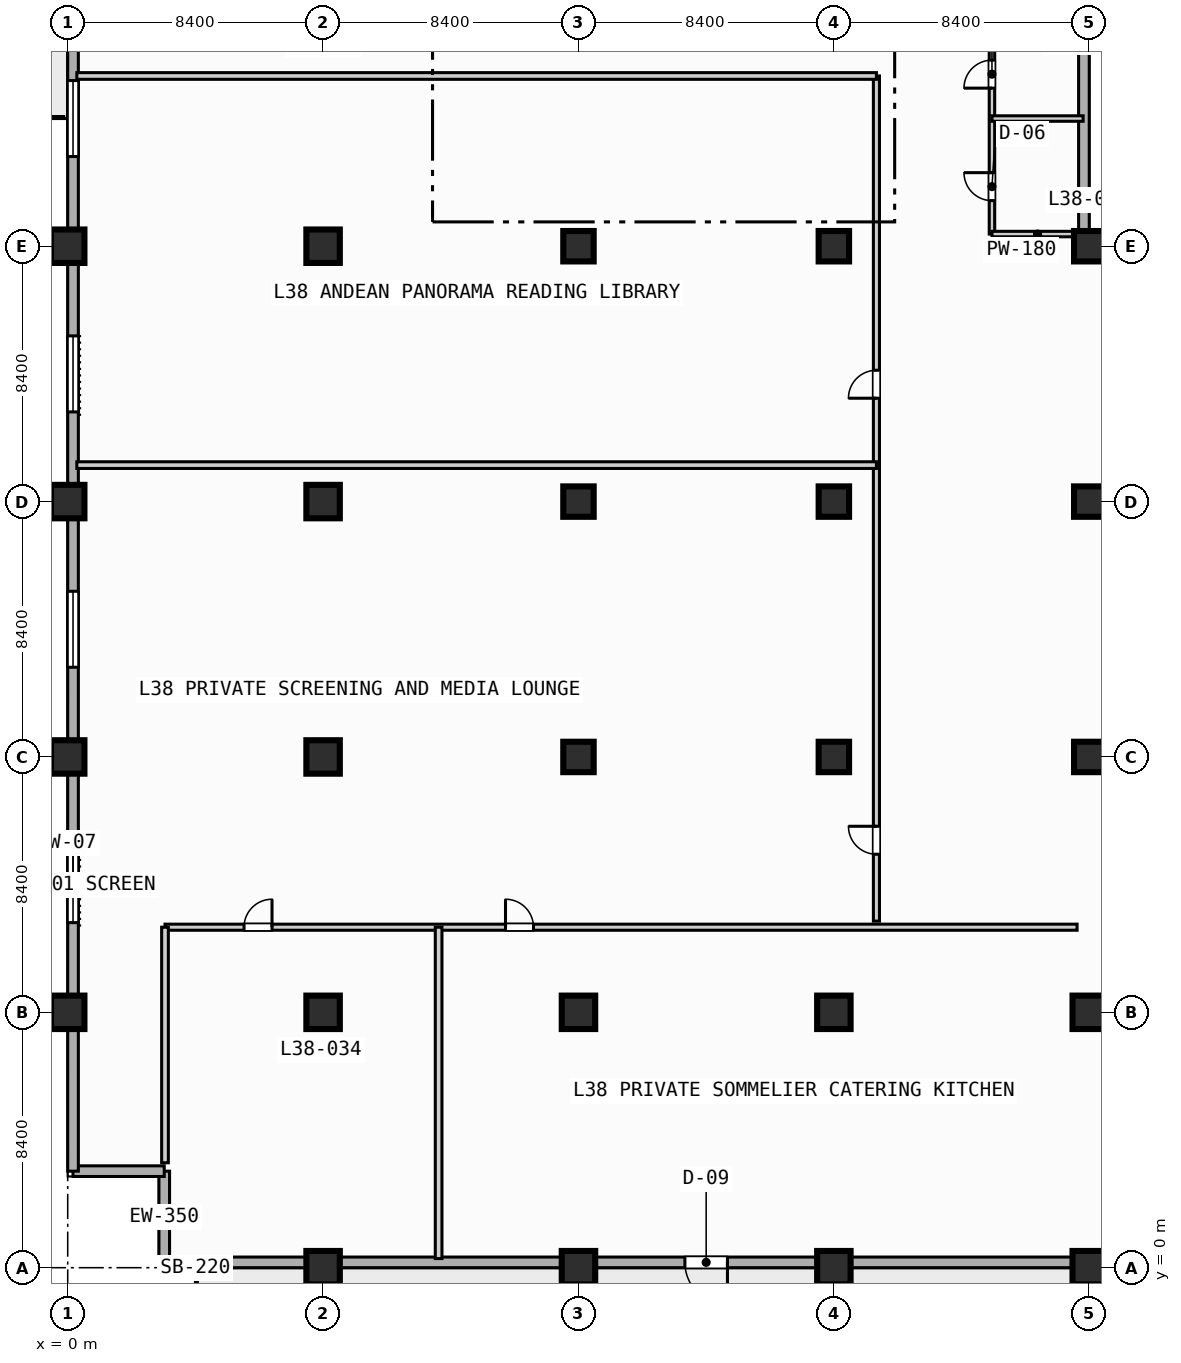
"""IFC4 building model, lengths in metres.
Left out: names, types, materials, properties, quantities, classifications, styles, units other than length and angle.
Written with IfcOpenShell. Run it as: python <this file> out.ifc"""

import sys

from ifc_helpers import new_model, si_unit, direction, frame, frame_2d, origin, origin_2d, place, context, subcontext, project, spatial, rectangle, extrude, element, fill, save


model = new_model("IFC4")
c1 = context("Model", 3, precision=1e-05, world=origin(), true_north=direction((0.0, 1.0)))
c2 = subcontext(c1, "Body", "Model", "MODEL_VIEW")
j1 = project(units=[si_unit("LENGTHUNIT", "METRE"), si_unit("PLANEANGLEUNIT", "RADIAN")], contexts=[c1])
p1 = place(None, origin())
s1 = spatial("IfcSite", under=j1, at=p1, CompositionType="ELEMENT")
p2 = place(p1, origin())
s2 = spatial("IfcBuilding", under=s1, at=p2, CompositionType="ELEMENT")
p3 = place(p2, frame((0.0, 0.0, 157.6)))
s3 = spatial("IfcBuildingStorey", under=s2, at=p3, CompositionType="ELEMENT", Elevation=157.6)
for number, where, z_axis, x_axis in (
    (1, (0.0, 8.4, 0.0), (0.0, 0.0, 1.0), (1.0, 0.0, 0.0)),
    (2, (0.0, 16.8, 0.0), (0.0, 0.0, 1.0), (1.0, 0.0, 0.0)),
    (3, (0.0, 25.2, 0.0), (0.0, 0.0, 1.0), (1.0, 0.0, 0.0)),
    (4, (0.0, 33.6, 0.0), (0.0, 0.0, 1.0), (1.0, 0.0, 0.0)),
    (5, (8.4, 0.0, 0.0), (0.0, 0.0, 1.0), (1.0, 0.0, 0.0)),
    (6, (8.4, 8.4, 0.0), (0.0, 0.0, 1.0), (1.0, 0.0, 0.0)),
    (7, (8.4, 16.8, 0.0), (0.0, 0.0, 1.0), (1.0, 0.0, 0.0)),
    (8, (8.4, 25.2, 0.0), (0.0, 0.0, 1.0), (1.0, 0.0, 0.0)),
    (9, (8.4, 33.6, 0.0), (0.0, 0.0, 1.0), (1.0, 0.0, 0.0)),
    (10, (16.8, 0.0, 0.0), (0.0, 0.0, 1.0), (1.0, 0.0, 0.0)),
    (11, (16.8, 8.4, 0.0), (0.0, 0.0, 1.0), (1.0, 0.0, 0.0)),
):
    element("IfcColumn", number, at=place(p3, frame(where, z_axis=z_axis, x_axis=x_axis)), inside=s3, PredefinedType="COLUMN", context=c2, shape_type="SweptSolid", body=[
        extrude(rectangle(XDim=1.1, YDim=1.1, at=origin_2d()), origin(), (0.0, 0.0, 1.0), 4.4),
    ])
for number, where, z_axis, x_axis in (
    (12, (16.8, 16.8, 0.0), (0.0, 0.0, 1.0), (1.0, 0.0, 0.0)),
    (13, (16.8, 25.2, 0.0), (0.0, 0.0, 1.0), (1.0, 0.0, 0.0)),
    (14, (16.8, 33.6, 0.0), (0.0, 0.0, 1.0), (1.0, 0.0, 0.0)),
):
    element("IfcColumn", number, at=place(p3, frame(where, z_axis=z_axis, x_axis=x_axis)), inside=s3, PredefinedType="COLUMN", context=c2, shape_type="SweptSolid", body=[
        extrude(rectangle(XDim=1.0, YDim=1.0, at=origin_2d()), origin(), (0.0, 0.0, 1.0), 4.4),
    ])
for number, where, z_axis, x_axis in (
    (15, (25.2, 0.0, 0.0), (0.0, 0.0, 1.0), (1.0, 0.0, 0.0)),
    (16, (25.2, 8.4, 0.0), (0.0, 0.0, 1.0), (1.0, 0.0, 0.0)),
):
    element("IfcColumn", number, at=place(p3, frame(where, z_axis=z_axis, x_axis=x_axis)), inside=s3, PredefinedType="COLUMN", context=c2, shape_type="SweptSolid", body=[
        extrude(rectangle(XDim=1.1, YDim=1.1, at=origin_2d()), origin(), (0.0, 0.0, 1.0), 4.4),
    ])
for number, where, z_axis, x_axis in (
    (17, (25.2, 16.8, 0.0), (0.0, 0.0, 1.0), (1.0, 0.0, 0.0)),
    (18, (25.2, 25.2, 0.0), (0.0, 0.0, 1.0), (1.0, 0.0, 0.0)),
    (19, (25.2, 33.6, 0.0), (0.0, 0.0, 1.0), (1.0, 0.0, 0.0)),
):
    element("IfcColumn", number, at=place(p3, frame(where, z_axis=z_axis, x_axis=x_axis)), inside=s3, PredefinedType="COLUMN", context=c2, shape_type="SweptSolid", body=[
        extrude(rectangle(XDim=1.0, YDim=1.0, at=origin_2d()), origin(), (0.0, 0.0, 1.0), 4.4),
    ])
for number, where, z_axis, x_axis in (
    (20, (33.6, 0.0, 0.0), (0.0, 0.0, 1.0), (1.0, 0.0, 0.0)),
    (21, (33.6, 8.4, 0.0), (0.0, 0.0, 1.0), (1.0, 0.0, 0.0)),
):
    element("IfcColumn", number, at=place(p3, frame(where, z_axis=z_axis, x_axis=x_axis)), inside=s3, PredefinedType="COLUMN", context=c2, shape_type="SweptSolid", body=[
        extrude(rectangle(XDim=1.1, YDim=1.1, at=origin_2d()), origin(), (0.0, 0.0, 1.0), 4.4),
    ])
for number, where, z_axis, x_axis in (
    (22, (33.6, 16.8, 0.0), (0.0, 0.0, 1.0), (1.0, 0.0, 0.0)),
    (23, (33.6, 25.2, 0.0), (0.0, 0.0, 1.0), (1.0, 0.0, 0.0)),
    (24, (33.6, 33.6, 0.0), (0.0, 0.0, 1.0), (1.0, 0.0, 0.0)),
):
    element("IfcColumn", number, at=place(p3, frame(where, z_axis=z_axis, x_axis=x_axis)), inside=s3, PredefinedType="COLUMN", context=c2, shape_type="SweptSolid", body=[
        extrude(rectangle(XDim=1.0, YDim=1.0, at=origin_2d()), origin(), (0.0, 0.0, 1.0), 4.4),
    ])
for number, where, z_axis, x_axis in (
    (25, (3.175, 0.175, 0.0), (0.0, 0.0, 1.0), (0.0, 1.0, 0.0)),
    (26, (3.175, 3.175, 0.0), (0.0, 0.0, 1.0), (-1.0, 0.0, 0.0)),
):
    element("IfcWall", number, at=place(p3, frame(where, z_axis=z_axis, x_axis=x_axis)), inside=s3, PredefinedType="STANDARD", context=c2, shape_type="SweptSolid", body=[
        extrude(rectangle(XDim=3.0, YDim=0.35, at=frame_2d((1.5, 0.0))), origin(), (0.0, 0.0, 1.0), 4.05),
    ])
p4 = place(p3, frame((0.175, 3.175, 0.0), z_axis=(0.0, 0.0, 1.0), x_axis=(0.0, 1.0, 0.0)))
e27 = element("IfcWall", 27, at=p4, inside=s3, PredefinedType="STANDARD", context=c2, shape_type="SweptSolid", body=[
    extrude(rectangle(XDim=69.25, YDim=0.35, at=frame_2d((34.625, 0.0))), origin(), (0.0, 0.0, 1.0), 4.05),
])
p5 = place(p4, frame((42.325, 0.0, 0.0)))
e28 = element("IfcOpeningElement", 28, at=p5, cuts=e27, PredefinedType="OPENING", context=c2, shape_type="SweptSolid", body=[
    extrude(rectangle(XDim=1.4, YDim=2.2, at=frame_2d((0.7, 1.1))), frame((0.0, 0.185, 0.0), z_axis=(0.0, -1.0, 0.0), x_axis=(1.0, 0.0, 0.0)), (0.0, 0.0, 1.0), 0.37),
])
p6 = place(p4, frame((8.175, 0.0, 0.85)))
e29 = element("IfcOpeningElement", 29, at=p6, cuts=e27, PredefinedType="OPENING", context=c2, shape_type="SweptSolid", body=[
    extrude(rectangle(XDim=2.5, YDim=2.2, at=frame_2d((1.25, 1.1))), frame((0.0, 0.185, 0.0), z_axis=(0.0, -1.0, 0.0), x_axis=(1.0, 0.0, 0.0)), (0.0, 0.0, 1.0), 0.37),
])
p7 = place(p4, frame((16.575, 0.0, 0.85)))
e30 = element("IfcOpeningElement", 30, at=p7, cuts=e27, PredefinedType="OPENING", context=c2, shape_type="SweptSolid", body=[
    extrude(rectangle(XDim=2.5, YDim=2.2, at=frame_2d((1.25, 1.1))), frame((0.0, 0.185, 0.0), z_axis=(0.0, -1.0, 0.0), x_axis=(1.0, 0.0, 0.0)), (0.0, 0.0, 1.0), 0.37),
])
p8 = place(p4, frame((24.975, 0.0, 0.85)))
e31 = element("IfcOpeningElement", 31, at=p8, cuts=e27, PredefinedType="OPENING", context=c2, shape_type="SweptSolid", body=[
    extrude(rectangle(XDim=2.5, YDim=2.2, at=frame_2d((1.25, 1.1))), frame((0.0, 0.185, 0.0), z_axis=(0.0, -1.0, 0.0), x_axis=(1.0, 0.0, 0.0)), (0.0, 0.0, 1.0), 0.37),
])
p9 = place(p4, frame((33.375, 0.0, 0.85)))
e32 = element("IfcOpeningElement", 32, at=p9, cuts=e27, PredefinedType="OPENING", context=c2, shape_type="SweptSolid", body=[
    extrude(rectangle(XDim=2.5, YDim=2.2, at=frame_2d((1.25, 1.1))), frame((0.0, 0.185, 0.0), z_axis=(0.0, -1.0, 0.0), x_axis=(1.0, 0.0, 0.0)), (0.0, 0.0, 1.0), 0.37),
])
p10 = place(p3, frame((33.425, 72.425, 0.0), z_axis=(0.0, 0.0, 1.0), x_axis=(0.0, -1.0, 0.0)))
e33 = element("IfcWall", 33, at=p10, inside=s3, PredefinedType="STANDARD", context=c2, shape_type="SweptSolid", body=[
    extrude(rectangle(XDim=39.0, YDim=0.35, at=frame_2d((19.5, 0.0))), origin(), (0.0, 0.0, 1.0), 4.05),
])
p11 = place(p3, frame((33.425, 33.425, 0.0), z_axis=(0.0, 0.0, 1.0), x_axis=(1.0, 0.0, 0.0)))
e34 = element("IfcWall", 34, at=p11, inside=s3, PredefinedType="STANDARD", context=c2, shape_type="SweptSolid", body=[
    extrude(rectangle(XDim=39.0, YDim=0.35, at=frame_2d((19.5, 0.0))), origin(), (0.0, 0.0, 1.0), 4.05),
])
p12 = place(p11, frame((12.075, 0.0, 0.0)))
e35 = element("IfcOpeningElement", 35, at=p12, cuts=e34, PredefinedType="OPENING", context=c2, shape_type="SweptSolid", body=[
    extrude(rectangle(XDim=1.4, YDim=2.2, at=frame_2d((0.7, 1.1))), frame((0.0, 0.185, 0.0), z_axis=(0.0, -1.0, 0.0), x_axis=(1.0, 0.0, 0.0)), (0.0, 0.0, 1.0), 0.37),
])
p13 = place(p3, frame((72.425, 0.175, 0.0), z_axis=(0.0, 0.0, 1.0), x_axis=(-1.0, 0.0, 0.0)))
e36 = element("IfcWall", 36, at=p13, inside=s3, PredefinedType="STANDARD", context=c2, shape_type="SweptSolid", body=[
    extrude(rectangle(XDim=69.25, YDim=0.35, at=frame_2d((34.625, 0.0))), origin(), (0.0, 0.0, 1.0), 4.05),
])
p14 = place(p13, frame((50.725, 0.0, 0.0)))
e37 = element("IfcOpeningElement", 37, at=p14, cuts=e36, PredefinedType="OPENING", context=c2, shape_type="SweptSolid", body=[
    extrude(rectangle(XDim=1.4, YDim=2.2, at=frame_2d((0.7, 1.1))), frame((0.0, 0.185, 0.0), z_axis=(0.0, -1.0, 0.0), x_axis=(1.0, 0.0, 0.0)), (0.0, 0.0, 1.0), 0.37),
])
p15 = place(p13, frame((24.975, 0.0, 0.85)))
e38 = element("IfcOpeningElement", 38, at=p15, cuts=e36, PredefinedType="OPENING", context=c2, shape_type="SweptSolid", body=[
    extrude(rectangle(XDim=2.5, YDim=2.2, at=frame_2d((1.25, 1.1))), frame((0.0, 0.185, 0.0), z_axis=(0.0, -1.0, 0.0), x_axis=(1.0, 0.0, 0.0)), (0.0, 0.0, 1.0), 0.37),
])
p16 = place(p13, frame((8.175, 0.0, 0.85)))
e39 = element("IfcOpeningElement", 39, at=p16, cuts=e36, PredefinedType="OPENING", context=c2, shape_type="SweptSolid", body=[
    extrude(rectangle(XDim=2.5, YDim=2.2, at=frame_2d((1.25, 1.1))), frame((0.0, 0.185, 0.0), z_axis=(0.0, -1.0, 0.0), x_axis=(1.0, 0.0, 0.0)), (0.0, 0.0, 1.0), 0.37),
])
p17 = place(p3, frame((30.4, 34.0, 0.0), z_axis=(0.0, 0.0, 1.0), x_axis=(0.0, 1.0, 0.0)))
e40 = element("IfcWall", 40, at=p17, inside=s3, PredefinedType="PLUMBINGWALL", context=c2, shape_type="SweptSolid", body=[
    extrude(rectangle(XDim=7.6, YDim=0.18, at=frame_2d((3.8, 0.0))), origin(), (0.0, 0.0, 1.0), 4.05),
])
p18 = place(p17, frame((1.1, 0.0, 0.0)))
e41 = element("IfcOpeningElement", 41, at=p18, cuts=e40, PredefinedType="OPENING", context=c2, shape_type="SweptSolid", body=[
    extrude(rectangle(XDim=0.92, YDim=2.1, at=frame_2d((0.46, 1.05))), frame((0.0, 0.1, 0.0), z_axis=(0.0, -1.0, 0.0), x_axis=(1.0, 0.0, 0.0)), (0.0, 0.0, 1.0), 0.2),
])
p19 = place(p17, frame((4.8, 0.0, 0.0)))
e42 = element("IfcOpeningElement", 42, at=p19, cuts=e40, PredefinedType="OPENING", context=c2, shape_type="SweptSolid", body=[
    extrude(rectangle(XDim=0.92, YDim=2.1, at=frame_2d((0.46, 1.05))), frame((0.0, 0.1, 0.0), z_axis=(0.0, -1.0, 0.0), x_axis=(1.0, 0.0, 0.0)), (0.0, 0.0, 1.0), 0.2),
])
for number, where, z_axis, x_axis in (
    (43, (30.4, 34.0, 0.0), (0.0, 0.0, 1.0), (1.0, 0.0, 0.0)),
    (44, (30.4, 37.8, 0.0), (0.0, 0.0, 1.0), (1.0, 0.0, 0.0)),
):
    element("IfcWall", number, at=place(p3, frame(where, z_axis=z_axis, x_axis=x_axis)), inside=s3, PredefinedType="PLUMBINGWALL", context=c2, shape_type="SweptSolid", body=[
        extrude(rectangle(XDim=3.0, YDim=0.18, at=frame_2d((1.5, 0.0))), origin(), (0.0, 0.0, 1.0), 4.05),
    ])
p20 = place(p3, frame((3.2, 11.2, 0.0), z_axis=(0.0, 0.0, 1.0), x_axis=(1.0, 0.0, 0.0)))
e45 = element("IfcWall", 45, at=p20, inside=s3, PredefinedType="PARTITIONING", context=c2, shape_type="SweptSolid", body=[
    extrude(rectangle(XDim=30.0, YDim=0.2, at=frame_2d((15.0, 0.0))), origin(), (0.0, 0.0, 1.0), 4.05),
])
p21 = place(p20, frame((2.6, 0.0, 0.0)))
e46 = element("IfcOpeningElement", 46, at=p21, cuts=e45, PredefinedType="OPENING", context=c2, shape_type="SweptSolid", body=[
    extrude(rectangle(XDim=0.92, YDim=2.1, at=frame_2d((0.46, 1.05))), frame((0.0, 0.11, 0.0), z_axis=(0.0, -1.0, 0.0), x_axis=(1.0, 0.0, 0.0)), (0.0, 0.0, 1.0), 0.22),
])
p22 = place(p20, frame((11.2, 0.0, 0.0)))
e47 = element("IfcOpeningElement", 47, at=p22, cuts=e45, PredefinedType="OPENING", context=c2, shape_type="SweptSolid", body=[
    extrude(rectangle(XDim=0.92, YDim=2.1, at=frame_2d((0.46, 1.05))), frame((0.0, 0.11, 0.0), z_axis=(0.0, -1.0, 0.0), x_axis=(1.0, 0.0, 0.0)), (0.0, 0.0, 1.0), 0.22),
])
p23 = place(p3, frame((3.2, 3.45, 0.0), z_axis=(0.0, 0.0, 1.0), x_axis=(0.0, 1.0, 0.0)))
e48 = element("IfcWall", 48, at=p23, inside=s3, PredefinedType="PARTITIONING", context=c2, shape_type="SweptSolid", body=[
    extrude(rectangle(XDim=7.75, YDim=0.22, at=frame_2d((3.875, 0.0))), origin(), (0.0, 0.0, 1.0), 4.05),
])
p24 = place(p3, frame((12.2, 0.3, 0.0), z_axis=(0.0, 0.0, 1.0), x_axis=(0.0, 1.0, 0.0)))
e49 = element("IfcWall", 49, at=p24, inside=s3, PredefinedType="PARTITIONING", context=c2, shape_type="SweptSolid", body=[
    extrude(rectangle(XDim=10.9, YDim=0.22, at=frame_2d((5.45, 0.0))), origin(), (0.0, 0.0, 1.0), 4.05),
])
p25 = place(p3, frame((26.6, 11.4, 0.0), z_axis=(0.0, 0.0, 1.0), x_axis=(0.0, 1.0, 0.0)))
e50 = element("IfcWall", 50, at=p25, inside=s3, PredefinedType="PARTITIONING", context=c2, shape_type="SweptSolid", body=[
    extrude(rectangle(XDim=27.8, YDim=0.2, at=frame_2d((13.9, 0.0))), origin(), (0.0, 0.0, 1.0), 4.05),
])
p26 = place(p25, frame((2.2, 0.0, 0.0)))
e51 = element("IfcOpeningElement", 51, at=p26, cuts=e50, PredefinedType="OPENING", context=c2, shape_type="SweptSolid", body=[
    extrude(rectangle(XDim=0.92, YDim=2.1, at=frame_2d((0.46, 1.05))), frame((0.0, 0.11, 0.0), z_axis=(0.0, -1.0, 0.0), x_axis=(1.0, 0.0, 0.0)), (0.0, 0.0, 1.0), 0.22),
])
p27 = place(p25, frame((17.2, 0.0, 0.0)))
e52 = element("IfcOpeningElement", 52, at=p27, cuts=e50, PredefinedType="OPENING", context=c2, shape_type="SweptSolid", body=[
    extrude(rectangle(XDim=0.92, YDim=2.1, at=frame_2d((0.46, 1.05))), frame((0.0, 0.11, 0.0), z_axis=(0.0, -1.0, 0.0), x_axis=(1.0, 0.0, 0.0)), (0.0, 0.0, 1.0), 0.22),
])
for number, where, z_axis, x_axis in (
    (53, (0.3, 26.4, 0.0), (0.0, 0.0, 1.0), (1.0, 0.0, 0.0)),
    (54, (0.3, 39.2, 0.0), (0.0, 0.0, 1.0), (1.0, 0.0, 0.0)),
):
    element("IfcWall", number, at=place(p3, frame(where, z_axis=z_axis, x_axis=x_axis)), inside=s3, PredefinedType="PARTITIONING", context=c2, shape_type="SweptSolid", body=[
        extrude(rectangle(XDim=26.3, YDim=0.22, at=frame_2d((13.15, 0.0))), origin(), (0.0, 0.0, 1.0), 4.05),
    ])
p28 = place(p6, origin())
e55 = element("IfcWindow", 55, at=p28, inside=s3, PartitioningType="SINGLE_PANEL", PredefinedType="WINDOW", context=c2, shape_type="SweptSolid", body=[
    extrude(rectangle(XDim=2.5, YDim=2.2, at=frame_2d((1.25, 1.1))), frame((0.0, 0.03, 0.0), z_axis=(0.0, -1.0, 0.0), x_axis=(1.0, 0.0, 0.0)), (0.0, 0.0, 1.0), 0.06),
])
fill(e29, e55)
p29 = place(p7, origin())
e56 = element("IfcWindow", 56, at=p29, inside=s3, PartitioningType="SINGLE_PANEL", PredefinedType="WINDOW", context=c2, shape_type="SweptSolid", body=[
    extrude(rectangle(XDim=2.5, YDim=2.2, at=frame_2d((1.25, 1.1))), frame((0.0, 0.03, 0.0), z_axis=(0.0, -1.0, 0.0), x_axis=(1.0, 0.0, 0.0)), (0.0, 0.0, 1.0), 0.06),
])
fill(e30, e56)
p30 = place(p8, origin())
e57 = element("IfcWindow", 57, at=p30, inside=s3, PartitioningType="SINGLE_PANEL", PredefinedType="WINDOW", context=c2, shape_type="SweptSolid", body=[
    extrude(rectangle(XDim=2.5, YDim=2.2, at=frame_2d((1.25, 1.1))), frame((0.0, 0.03, 0.0), z_axis=(0.0, -1.0, 0.0), x_axis=(1.0, 0.0, 0.0)), (0.0, 0.0, 1.0), 0.06),
])
fill(e31, e57)
p31 = place(p9, origin())
e58 = element("IfcWindow", 58, at=p31, inside=s3, PartitioningType="SINGLE_PANEL", PredefinedType="WINDOW", context=c2, shape_type="SweptSolid", body=[
    extrude(rectangle(XDim=2.5, YDim=2.2, at=frame_2d((1.25, 1.1))), frame((0.0, 0.03, 0.0), z_axis=(0.0, -1.0, 0.0), x_axis=(1.0, 0.0, 0.0)), (0.0, 0.0, 1.0), 0.06),
])
fill(e32, e58)
p32 = place(p14, origin())
e59 = element("IfcDoor", 59, at=p32, inside=s3, OperationType="SINGLE_SWING_LEFT", PredefinedType="DOOR", context=c2, shape_type="SweptSolid", body=[
    extrude(rectangle(XDim=1.4, YDim=2.2, at=frame_2d((0.7, 1.1))), frame((0.0, 0.025, 0.0), z_axis=(0.0, -1.0, 0.0), x_axis=(1.0, 0.0, 0.0)), (0.0, 0.0, 1.0), 0.05),
])
fill(e37, e59)
p33 = place(p18, origin())
e60 = element("IfcDoor", 60, at=p33, inside=s3, OperationType="SINGLE_SWING_RIGHT", PredefinedType="DOOR", context=c2, shape_type="SweptSolid", body=[
    extrude(rectangle(XDim=0.92, YDim=2.1, at=frame_2d((0.46, 1.05))), frame((0.0, 0.025, 0.0), z_axis=(0.0, -1.0, 0.0), x_axis=(1.0, 0.0, 0.0)), (0.0, 0.0, 1.0), 0.05),
])
fill(e41, e60)
p34 = place(p19, origin())
e61 = element("IfcDoor", 61, at=p34, inside=s3, OperationType="SINGLE_SWING_LEFT", PredefinedType="DOOR", context=c2, shape_type="SweptSolid", body=[
    extrude(rectangle(XDim=0.92, YDim=2.1, at=frame_2d((0.46, 1.05))), frame((0.0, 0.025, 0.0), z_axis=(0.0, -1.0, 0.0), x_axis=(1.0, 0.0, 0.0)), (0.0, 0.0, 1.0), 0.05),
])
fill(e42, e61)
p35 = place(p21, origin())
e62 = element("IfcDoor", 62, at=p35, inside=s3, OperationType="SINGLE_SWING_RIGHT", PredefinedType="DOOR", context=c2, shape_type="SweptSolid", body=[
    extrude(rectangle(XDim=0.92, YDim=2.1, at=frame_2d((0.46, 1.05))), frame((0.0, 0.025, 0.0), z_axis=(0.0, -1.0, 0.0), x_axis=(1.0, 0.0, 0.0)), (0.0, 0.0, 1.0), 0.05),
])
fill(e46, e62)
p36 = place(p22, origin())
e63 = element("IfcDoor", 63, at=p36, inside=s3, OperationType="SINGLE_SWING_LEFT", PredefinedType="DOOR", context=c2, shape_type="SweptSolid", body=[
    extrude(rectangle(XDim=0.92, YDim=2.1, at=frame_2d((0.46, 1.05))), frame((0.0, 0.025, 0.0), z_axis=(0.0, -1.0, 0.0), x_axis=(1.0, 0.0, 0.0)), (0.0, 0.0, 1.0), 0.05),
])
fill(e47, e63)
p37 = place(p26, origin())
e64 = element("IfcDoor", 64, at=p37, inside=s3, OperationType="SINGLE_SWING_RIGHT", PredefinedType="DOOR", context=c2, shape_type="SweptSolid", body=[
    extrude(rectangle(XDim=0.92, YDim=2.1, at=frame_2d((0.46, 1.05))), frame((0.0, 0.025, 0.0), z_axis=(0.0, -1.0, 0.0), x_axis=(1.0, 0.0, 0.0)), (0.0, 0.0, 1.0), 0.05),
])
fill(e51, e64)
p38 = place(p27, origin())
e65 = element("IfcDoor", 65, at=p38, inside=s3, OperationType="SINGLE_SWING_LEFT", PredefinedType="DOOR", context=c2, shape_type="SweptSolid", body=[
    extrude(rectangle(XDim=0.92, YDim=2.1, at=frame_2d((0.46, 1.05))), frame((0.0, 0.025, 0.0), z_axis=(0.0, -1.0, 0.0), x_axis=(1.0, 0.0, 0.0)), (0.0, 0.0, 1.0), 0.05),
])
fill(e52, e65)
save(model, sys.argv[1])
